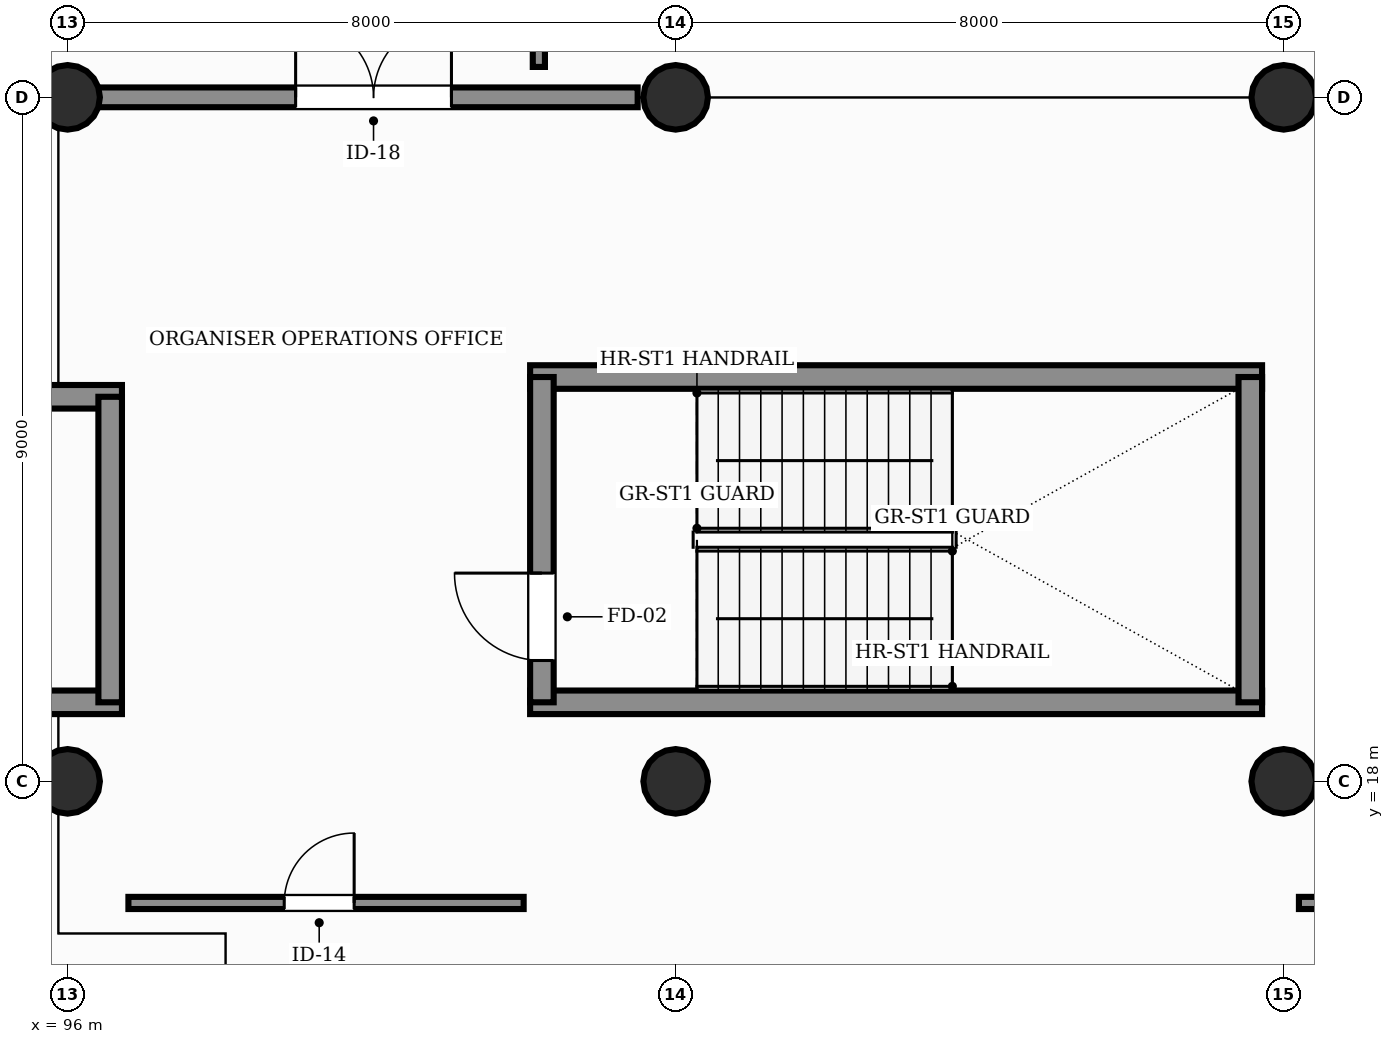
"""IFC4 building model, lengths in metres.
Left out: names, types, materials, properties, quantities, classifications, styles, units other than length and angle.
Written with IfcOpenShell. Run it as: python <this file> out.ifc"""

import sys

from ifc_helpers import new_model, si_unit, direction, frame, frame_2d, origin, origin_2d, place, context, subcontext, project, spatial, rectangle, circle, extrude, element, fill, save


model = new_model("IFC4")
c1 = context("Model", 3, precision=1e-05, world=origin(), true_north=direction((0.0, 1.0)))
c2 = subcontext(c1, "Body", "Model", "MODEL_VIEW")
j1 = project(units=[si_unit("LENGTHUNIT", "METRE"), si_unit("PLANEANGLEUNIT", "RADIAN")], contexts=[c1])
p1 = place(None, origin())
s1 = spatial("IfcSite", under=j1, at=p1, CompositionType="ELEMENT")
p2 = place(p1, origin())
s2 = spatial("IfcBuilding", under=s1, at=p2, CompositionType="ELEMENT")
p3 = place(p2, frame((0.0, 0.0, 11.4)))
s3 = spatial("IfcBuildingStorey", under=s2, at=p3, CompositionType="ELEMENT", Elevation=11.4)
for number, where, z_axis, x_axis in (
    (1, (96.0, 18.0, 0.0), (0.0, 0.0, 1.0), (1.0, 0.0, 0.0)),
    (2, (96.0, 27.0, 0.0), (0.0, 0.0, 1.0), (1.0, 0.0, 0.0)),
    (3, (104.0, 18.0, 0.0), (0.0, 0.0, 1.0), (1.0, 0.0, 0.0)),
    (4, (104.0, 27.0, 0.0), (0.0, 0.0, 1.0), (1.0, 0.0, 0.0)),
    (5, (112.0, 18.0, 0.0), (0.0, 0.0, 1.0), (1.0, 0.0, 0.0)),
    (6, (112.0, 27.0, 0.0), (0.0, 0.0, 1.0), (1.0, 0.0, 0.0)),
):
    element("IfcColumn", number, at=place(p3, frame(where, z_axis=z_axis, x_axis=x_axis)), inside=s3, PredefinedType="COLUMN", context=c2, shape_type="SweptSolid", body=[
        extrude(circle(Radius=0.425, at=origin_2d()), origin(), (0.0, 0.0, 1.0), 4.8),
    ])
for number, where, z_axis, x_axis in (
    (7, (102.085, 19.04, 0.0), (0.0, 0.0, 1.0), (1.0, 0.0, 0.0)),
    (8, (102.085, 23.32, 0.0), (0.0, 0.0, 1.0), (1.0, 0.0, 0.0)),
):
    element("IfcWall", number, at=place(p3, frame(where, z_axis=z_axis, x_axis=x_axis)), inside=s3, PredefinedType="SHEAR", context=c2, shape_type="SweptSolid", body=[
        extrude(rectangle(XDim=9.63, YDim=0.31, at=frame_2d((4.815, 0.0))), origin(), (0.0, 0.0, 1.0), 4.8),
    ])
p4 = place(p3, frame((102.24, 19.04, 0.0), z_axis=(0.0, 0.0, 1.0), x_axis=(0.0, 1.0, 0.0)))
e9 = element("IfcWall", 9, at=p4, inside=s3, PredefinedType="SHEAR", context=c2, shape_type="SweptSolid", body=[
    extrude(rectangle(XDim=4.28, YDim=0.31, at=frame_2d((2.14, 0.0))), origin(), (0.0, 0.0, 1.0), 4.8),
])
p5 = place(p4, frame((0.55, 0.0, 0.0)))
e10 = element("IfcOpeningElement", 10, at=p5, cuts=e9, PredefinedType="OPENING", context=c2, shape_type="SweptSolid", body=[
    extrude(rectangle(XDim=1.15, YDim=2.2, at=frame_2d((0.575, 1.1))), frame((0.0, 0.165, 0.0), z_axis=(0.0, -1.0, 0.0), x_axis=(1.0, 0.0, 0.0)), (0.0, 0.0, 1.0), 0.33),
])
p6 = place(p3, frame((111.56, 19.04, 0.0), z_axis=(0.0, 0.0, 1.0), x_axis=(0.0, 1.0, 0.0)))
e11 = element("IfcWall", 11, at=p6, inside=s3, PredefinedType="SHEAR", context=c2, shape_type="SweptSolid", body=[
    extrude(rectangle(XDim=4.28, YDim=0.31, at=frame_2d((2.14, 0.0))), origin(), (0.0, 0.0, 1.0), 4.8),
])
for number, where, z_axis, x_axis in (
    (12, (87.085, 19.04, 0.0), (0.0, 0.0, 1.0), (1.0, 0.0, 0.0)),
    (13, (87.085, 23.06, 0.0), (0.0, 0.0, 1.0), (1.0, 0.0, 0.0)),
):
    element("IfcWall", number, at=place(p3, frame(where, z_axis=z_axis, x_axis=x_axis)), inside=s3, PredefinedType="SHEAR", context=c2, shape_type="SweptSolid", body=[
        extrude(rectangle(XDim=9.63, YDim=0.31, at=frame_2d((4.815, 0.0))), origin(), (0.0, 0.0, 1.0), 4.8),
    ])
p7 = place(p3, frame((96.56, 19.04, 0.0), z_axis=(0.0, 0.0, 1.0), x_axis=(0.0, 1.0, 0.0)))
e14 = element("IfcWall", 14, at=p7, inside=s3, PredefinedType="SHEAR", context=c2, shape_type="SweptSolid", body=[
    extrude(rectangle(XDim=4.02, YDim=0.31, at=frame_2d((2.01, 0.0))), origin(), (0.0, 0.0, 1.0), 4.8),
])
p8 = place(p3, frame((96.8, 16.4, 0.0), z_axis=(0.0, 0.0, 1.0), x_axis=(1.0, 0.0, 0.0)))
e15 = element("IfcWall", 15, at=p8, inside=s3, PredefinedType="PARTITIONING", context=c2, shape_type="SweptSolid", body=[
    extrude(rectangle(XDim=5.2, YDim=0.16, at=frame_2d((2.6, 0.0))), origin(), (0.0, 0.0, 1.0), 3.4),
])
p9 = place(p8, frame((2.05, 0.0, 0.0)))
e16 = element("IfcOpeningElement", 16, at=p9, cuts=e15, PredefinedType="OPENING", context=c2, shape_type="SweptSolid", body=[
    extrude(rectangle(XDim=0.92, YDim=2.15, at=frame_2d((0.46, 1.075))), frame((0.0, 0.09, 0.0), z_axis=(0.0, -1.0, 0.0), x_axis=(1.0, 0.0, 0.0)), (0.0, 0.0, 1.0), 0.18),
])
p10 = place(p3, frame((112.2, 16.4, 0.0), z_axis=(0.0, 0.0, 1.0), x_axis=(1.0, 0.0, 0.0)))
e17 = element("IfcWall", 17, at=p10, inside=s3, PredefinedType="PARTITIONING", context=c2, shape_type="SweptSolid", body=[
    extrude(rectangle(XDim=7.2, YDim=0.16, at=frame_2d((3.6, 0.0))), origin(), (0.0, 0.0, 1.0), 3.4),
])
p11 = place(p10, frame((3.05, 0.0, 0.0)))
e18 = element("IfcOpeningElement", 18, at=p11, cuts=e17, PredefinedType="OPENING", context=c2, shape_type="SweptSolid", body=[
    extrude(rectangle(XDim=0.9, YDim=2.15, at=frame_2d((0.45, 1.075))), frame((0.0, 0.09, 0.0), z_axis=(0.0, -1.0, 0.0), x_axis=(1.0, 0.0, 0.0)), (0.0, 0.0, 1.0), 0.18),
])
p12 = place(p3, frame((88.6, 27.0, 0.0), z_axis=(0.0, 0.0, 1.0), x_axis=(1.0, 0.0, 0.0)))
e19 = element("IfcWall", 19, at=p12, inside=s3, PredefinedType="SOLIDWALL", context=c2, shape_type="SweptSolid", body=[
    extrude(rectangle(XDim=14.9, YDim=0.26, at=frame_2d((7.45, 0.0))), origin(), (0.0, 0.0, 1.0), 4.8),
])
p13 = place(p12, frame((3.4, 0.0, 0.0)))
e20 = element("IfcOpeningElement", 20, at=p13, cuts=e19, PredefinedType="OPENING", context=c2, shape_type="SweptSolid", body=[
    extrude(rectangle(XDim=2.1, YDim=2.4, at=frame_2d((1.05, 1.2))), frame((0.0, 0.14, 0.0), z_axis=(0.0, -1.0, 0.0), x_axis=(1.0, 0.0, 0.0)), (0.0, 0.0, 1.0), 0.28),
])
p14 = place(p12, frame((10.4, 0.0, 0.0)))
e21 = element("IfcOpeningElement", 21, at=p14, cuts=e19, PredefinedType="OPENING", context=c2, shape_type="SweptSolid", body=[
    extrude(rectangle(XDim=2.05, YDim=2.5, at=frame_2d((1.025, 1.25))), frame((0.0, 0.14, 0.0), z_axis=(0.0, -1.0, 0.0), x_axis=(1.0, 0.0, 0.0)), (0.0, 0.0, 1.0), 0.28),
])
p15 = place(p3, frame((102.2, 27.4, 0.0), z_axis=(0.0, 0.0, 1.0), x_axis=(0.0, 1.0, 0.0)))
e22 = element("IfcWall", 22, at=p15, inside=s3, PredefinedType="PARTITIONING", context=c2, shape_type="SweptSolid", body=[
    extrude(rectangle(XDim=24.2, YDim=0.16, at=frame_2d((12.1, 0.0))), origin(), (0.0, 0.0, 1.0), 3.4),
])
p16 = place(p15, frame((6.5, 0.0, 0.0)))
e23 = element("IfcOpeningElement", 23, at=p16, cuts=e22, PredefinedType="OPENING", context=c2, shape_type="SweptSolid", body=[
    extrude(rectangle(XDim=2.2, YDim=2.6, at=frame_2d((1.1, 1.3))), frame((0.0, 0.09, 0.0), z_axis=(0.0, -1.0, 0.0), x_axis=(1.0, 0.0, 0.0)), (0.0, 0.0, 1.0), 0.18),
])
p17 = place(p15, frame((16.5, 0.0, 0.0)))
e24 = element("IfcOpeningElement", 24, at=p17, cuts=e22, PredefinedType="OPENING", context=c2, shape_type="SweptSolid", body=[
    extrude(rectangle(XDim=2.2, YDim=2.6, at=frame_2d((1.1, 1.3))), frame((0.0, 0.09, 0.0), z_axis=(0.0, -1.0, 0.0), x_axis=(1.0, 0.0, 0.0)), (0.0, 0.0, 1.0), 0.18),
])
p18 = place(p5, origin())
e25 = element("IfcDoor", 25, at=p18, inside=s3, OperationType="SINGLE_SWING_RIGHT", PredefinedType="DOOR", context=c2, shape_type="SweptSolid", body=[
    extrude(rectangle(XDim=1.15, YDim=2.2, at=frame_2d((0.575, 1.1))), frame((0.0, 0.025, 0.0), z_axis=(0.0, -1.0, 0.0), x_axis=(1.0, 0.0, 0.0)), (0.0, 0.0, 1.0), 0.05),
])
fill(e10, e25)
p19 = place(p9, origin())
e26 = element("IfcDoor", 26, at=p19, inside=s3, OperationType="SINGLE_SWING_RIGHT", PredefinedType="DOOR", context=c2, shape_type="SweptSolid", body=[
    extrude(rectangle(XDim=0.92, YDim=2.15, at=frame_2d((0.46, 1.075))), frame((0.0, 0.025, 0.0), z_axis=(0.0, -1.0, 0.0), x_axis=(1.0, 0.0, 0.0)), (0.0, 0.0, 1.0), 0.05),
])
fill(e16, e26)
p20 = place(p14, origin())
e27 = element("IfcDoor", 27, at=p20, inside=s3, OperationType="DOUBLE_DOOR_SINGLE_SWING", PredefinedType="DOOR", context=c2, shape_type="SweptSolid", body=[
    extrude(rectangle(XDim=2.05, YDim=2.5, at=frame_2d((1.025, 1.25))), frame((0.0, 0.025, 0.0), z_axis=(0.0, -1.0, 0.0), x_axis=(1.0, 0.0, 0.0)), (0.0, 0.0, 1.0), 0.05),
])
fill(e21, e27)
save(model, sys.argv[1])
